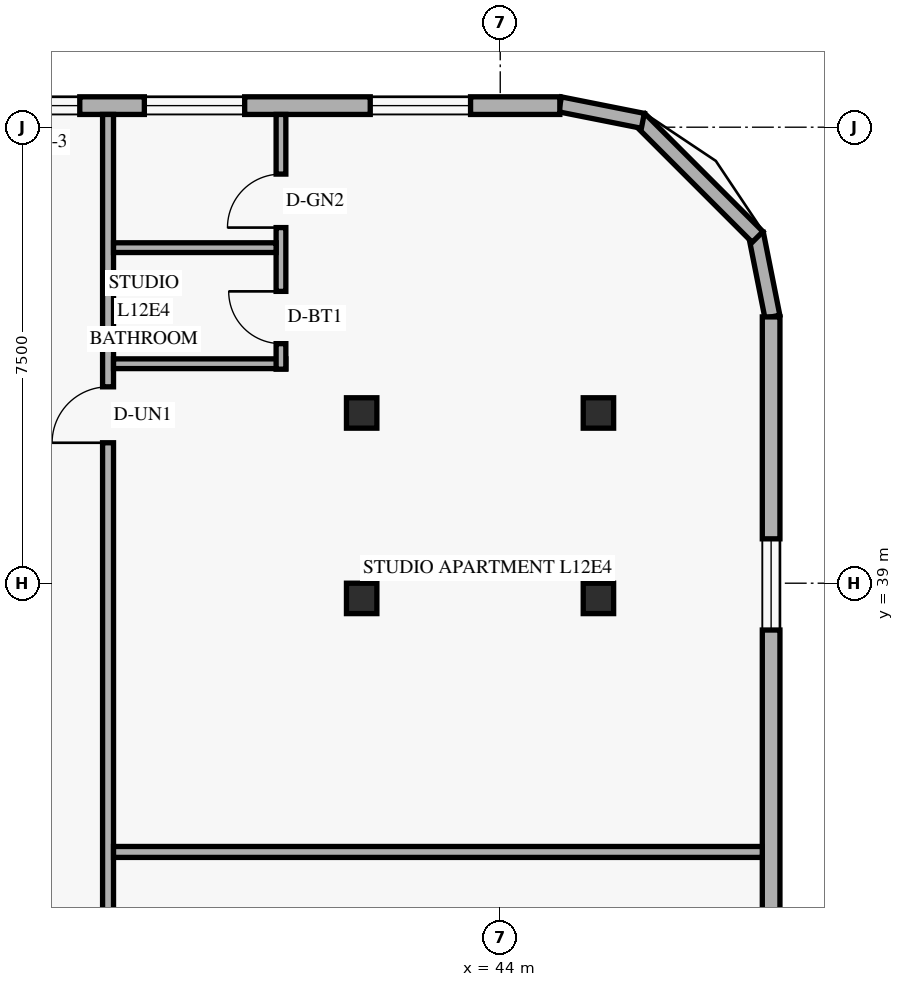
"""IFC4 building model, lengths in metres.
Left out: names, types, materials, properties, quantities, classifications, styles, units other than length and angle.
Written with IfcOpenShell. Run it as: python <this file> out.ifc"""

import sys

from ifc_helpers import new_model, si_unit, direction, frame, frame_2d, origin, origin_2d, place, context, subcontext, project, spatial, rectangle, hollow_rectangle, extrude, element, fill, save


model = new_model("IFC4")
c1 = context("Model", 3, precision=1e-05, world=origin(), true_north=direction((0.0, 1.0)))
c2 = subcontext(c1, "Body", "Model", "MODEL_VIEW")
j1 = project(units=[si_unit("LENGTHUNIT", "METRE"), si_unit("PLANEANGLEUNIT", "RADIAN")], contexts=[c1])
p1 = place(None, origin())
s1 = spatial("IfcSite", under=j1, at=p1, CompositionType="ELEMENT")
p2 = place(p1, origin())
s2 = spatial("IfcBuilding", under=s1, at=p2, CompositionType="ELEMENT")
p3 = place(p2, frame((0.0, 0.0, 49.2)))
s3 = spatial("IfcBuildingStorey", under=s2, at=p3, CompositionType="ELEMENT", Elevation=49.2)
for number, where, z_axis, x_axis in (
    (1, (41.658, 38.75, 0.0), (0.035, 0.0, 0.999), (0.0, 1.0, 0.0)),
    (2, (41.658, 41.8, 0.0), (0.035, 0.0, 0.999), (0.0, 1.0, 0.0)),
):
    element("IfcColumn", number, at=place(p3, frame(where, z_axis=z_axis, x_axis=x_axis)), inside=s3, PredefinedType="COLUMN", context=c2, shape_type="SweptSolid", body=[
        extrude(hollow_rectangle(XDim=0.5, YDim=0.5, WallThickness=0.022, at=origin_2d()), origin(), (0.0, 0.0, 1.0), 3.602),
    ])
for number, where, z_axis, x_axis in (
    (3, (45.51, 38.75, 0.0), (0.058, 0.0, 0.998), (0.0, 1.0, 0.0)),
    (4, (45.51, 41.8, 0.0), (0.058, 0.0, 0.998), (0.0, 1.0, 0.0)),
):
    element("IfcColumn", number, at=place(p3, frame(where, z_axis=z_axis, x_axis=x_axis)), inside=s3, PredefinedType="COLUMN", context=c2, shape_type="SweptSolid", body=[
        extrude(hollow_rectangle(XDim=0.5, YDim=0.5, WallThickness=0.022, at=origin_2d()), origin(), (0.0, 0.0, 1.0), 3.606),
    ])
p4 = place(p3, frame((48.476, 43.384, 0.0), z_axis=(0.0, 0.0, 1.0), x_axis=(-0.19496651342, 0.980809899341, 0.0)))
e5 = element("IfcWall", 5, at=p4, inside=s3, PredefinedType="SOLIDWALL", context=c2, shape_type="SweptSolid", body=[
    extrude(rectangle(XDim=1.389, YDim=0.25, at=frame_2d((0.694, 0.0))), origin(), (0.0, 0.0, 1.0), 3.36),
])
p5 = place(p3, frame((48.232, 44.695, 0.0), z_axis=(0.0, 0.0, 1.0), x_axis=(-0.707106781187, 0.707106781187, 0.0)))
e6 = element("IfcWall", 6, at=p5, inside=s3, PredefinedType="SOLIDWALL", context=c2, shape_type="SweptSolid", body=[
    extrude(rectangle(XDim=2.739, YDim=0.25, at=frame_2d((1.37, 0.0))), origin(), (0.0, 0.0, 1.0), 3.36),
])
p6 = place(p3, frame((46.345, 46.605, 0.0), z_axis=(0.0, 0.0, 1.0), x_axis=(-0.980809899341, 0.19496651342, 0.0)))
e7 = element("IfcWall", 7, at=p6, inside=s3, PredefinedType="SOLIDWALL", context=c2, shape_type="SweptSolid", body=[
    extrude(rectangle(XDim=1.389, YDim=0.25, at=frame_2d((0.694, 0.0))), origin(), (0.0, 0.0, 1.0), 3.36),
])
p7 = place(p3, frame((48.455, 27.8, 0.0), z_axis=(0.0, 0.0, 1.0), x_axis=(0.0, 1.0, 0.0)))
e8 = element("IfcWall", 8, at=p7, inside=s3, PredefinedType="SOLIDWALL", context=c2, shape_type="SweptSolid", body=[
    extrude(rectangle(XDim=15.58, YDim=0.29, at=frame_2d((7.79, 0.0))), origin(), (0.0, 0.0, 1.0), 3.36),
])
p8 = place(p7, frame((2.64, 0.0, 0.85)))
e9 = element("IfcOpeningElement", 9, at=p8, cuts=e8, PredefinedType="OPENING", context=c2, shape_type="SweptSolid", body=[
    extrude(rectangle(XDim=1.5, YDim=1.55, at=frame_2d((0.75, 0.775))), frame((0.0, 0.155, 0.0), z_axis=(0.0, -1.0, 0.0), x_axis=(1.0, 0.0, 0.0)), (0.0, 0.0, 1.0), 0.31),
])
p9 = place(p7, frame((10.43, 0.0, 0.85)))
e10 = element("IfcOpeningElement", 10, at=p9, cuts=e8, PredefinedType="OPENING", context=c2, shape_type="SweptSolid", body=[
    extrude(rectangle(XDim=1.5, YDim=1.55, at=frame_2d((0.75, 0.775))), frame((0.0, 0.155, 0.0), z_axis=(0.0, -1.0, 0.0), x_axis=(1.0, 0.0, 0.0)), (0.0, 0.0, 1.0), 0.31),
])
p10 = place(p3, frame((44.98, 46.855, 0.0), z_axis=(0.0, 0.0, 1.0), x_axis=(-1.0, 0.0, 0.0)))
e11 = element("IfcWall", 11, at=p10, inside=s3, PredefinedType="SOLIDWALL", context=c2, shape_type="SweptSolid", body=[
    extrude(rectangle(XDim=39.56, YDim=0.29, at=frame_2d((19.78, 0.0))), origin(), (0.0, 0.0, 1.0), 3.36),
])
p11 = place(p10, frame((35.295, 0.0, 0.85)))
e12 = element("IfcOpeningElement", 12, at=p11, cuts=e11, PredefinedType="OPENING", context=c2, shape_type="SweptSolid", body=[
    extrude(rectangle(XDim=1.65, YDim=1.6, at=frame_2d((0.825, 0.8))), frame((0.0, 0.155, 0.0), z_axis=(0.0, -1.0, 0.0), x_axis=(1.0, 0.0, 0.0)), (0.0, 0.0, 1.0), 0.31),
])
p12 = place(p10, frame((31.18, 0.0, 0.85)))
e13 = element("IfcOpeningElement", 13, at=p12, cuts=e11, PredefinedType="OPENING", context=c2, shape_type="SweptSolid", body=[
    extrude(rectangle(XDim=1.2, YDim=1.5, at=frame_2d((0.6, 0.75))), frame((0.0, 0.155, 0.0), z_axis=(0.0, -1.0, 0.0), x_axis=(1.0, 0.0, 0.0)), (0.0, 0.0, 1.0), 0.31),
])
p13 = place(p10, frame((25.684, 0.0, 0.85)))
e14 = element("IfcOpeningElement", 14, at=p13, cuts=e11, PredefinedType="OPENING", context=c2, shape_type="SweptSolid", body=[
    extrude(rectangle(XDim=1.65, YDim=1.6, at=frame_2d((0.825, 0.8))), frame((0.0, 0.155, 0.0), z_axis=(0.0, -1.0, 0.0), x_axis=(1.0, 0.0, 0.0)), (0.0, 0.0, 1.0), 0.31),
])
p14 = place(p10, frame((18.649, 0.0, 0.85)))
e15 = element("IfcOpeningElement", 15, at=p14, cuts=e11, PredefinedType="OPENING", context=c2, shape_type="SweptSolid", body=[
    extrude(rectangle(XDim=1.65, YDim=1.6, at=frame_2d((0.825, 0.8))), frame((0.0, 0.155, 0.0), z_axis=(0.0, -1.0, 0.0), x_axis=(1.0, 0.0, 0.0)), (0.0, 0.0, 1.0), 0.31),
])
p15 = place(p10, frame((12.359, 0.0, 0.85)))
e16 = element("IfcOpeningElement", 16, at=p15, cuts=e11, PredefinedType="OPENING", context=c2, shape_type="SweptSolid", body=[
    extrude(rectangle(XDim=1.65, YDim=1.6, at=frame_2d((0.825, 0.8))), frame((0.0, 0.155, 0.0), z_axis=(0.0, -1.0, 0.0), x_axis=(1.0, 0.0, 0.0)), (0.0, 0.0, 1.0), 0.31),
])
p16 = place(p10, frame((7.895, 0.0, 0.85)))
e17 = element("IfcOpeningElement", 17, at=p16, cuts=e11, PredefinedType="OPENING", context=c2, shape_type="SweptSolid", body=[
    extrude(rectangle(XDim=1.2, YDim=1.5, at=frame_2d((0.6, 0.75))), frame((0.0, 0.155, 0.0), z_axis=(0.0, -1.0, 0.0), x_axis=(1.0, 0.0, 0.0)), (0.0, 0.0, 1.0), 0.31),
])
p17 = place(p10, frame((5.183, 0.0, 0.85)))
e18 = element("IfcOpeningElement", 18, at=p17, cuts=e11, PredefinedType="OPENING", context=c2, shape_type="SweptSolid", body=[
    extrude(rectangle(XDim=1.65, YDim=1.6, at=frame_2d((0.825, 0.8))), frame((0.0, 0.155, 0.0), z_axis=(0.0, -1.0, 0.0), x_axis=(1.0, 0.0, 0.0)), (0.0, 0.0, 1.0), 0.31),
])
p18 = place(p10, frame((1.468, 0.0, 0.85)))
e19 = element("IfcOpeningElement", 19, at=p18, cuts=e11, PredefinedType="OPENING", context=c2, shape_type="SweptSolid", body=[
    extrude(rectangle(XDim=1.65, YDim=1.6, at=frame_2d((0.825, 0.8))), frame((0.0, 0.155, 0.0), z_axis=(0.0, -1.0, 0.0), x_axis=(1.0, 0.0, 0.0)), (0.0, 0.0, 1.0), 0.31),
])
p19 = place(p3, frame((37.55, 1.29, 0.0), z_axis=(0.0, 0.0, 1.0), x_axis=(0.0, 1.0, 0.0)))
e20 = element("IfcWall", 20, at=p19, inside=s3, PredefinedType="STANDARD", context=c2, shape_type="SweptSolid", body=[
    extrude(rectangle(XDim=45.42, YDim=0.18, at=frame_2d((22.71, 0.0))), origin(), (0.0, 0.0, 1.0), 2.649),
])
p20 = place(p19, frame((4.46, 0.0, 0.0)))
e21 = element("IfcOpeningElement", 21, at=p20, cuts=e20, PredefinedType="OPENING", context=c2, shape_type="SweptSolid", body=[
    extrude(rectangle(XDim=0.92, YDim=2.15, at=frame_2d((0.46, 1.075))), frame((0.0, 0.1, 0.0), z_axis=(0.0, -1.0, 0.0), x_axis=(1.0, 0.0, 0.0)), (0.0, 0.0, 1.0), 0.2),
])
p21 = place(p19, frame((14.37, 0.0, 0.0)))
e22 = element("IfcOpeningElement", 22, at=p21, cuts=e20, PredefinedType="OPENING", context=c2, shape_type="SweptSolid", body=[
    extrude(rectangle(XDim=0.92, YDim=2.15, at=frame_2d((0.46, 1.075))), frame((0.0, 0.1, 0.0), z_axis=(0.0, -1.0, 0.0), x_axis=(1.0, 0.0, 0.0)), (0.0, 0.0, 1.0), 0.2),
])
p22 = place(p19, frame((25.87, 0.0, 0.0)))
e23 = element("IfcOpeningElement", 23, at=p22, cuts=e20, PredefinedType="OPENING", context=c2, shape_type="SweptSolid", body=[
    extrude(rectangle(XDim=0.92, YDim=2.15, at=frame_2d((0.46, 1.075))), frame((0.0, 0.1, 0.0), z_axis=(0.0, -1.0, 0.0), x_axis=(1.0, 0.0, 0.0)), (0.0, 0.0, 1.0), 0.2),
])
p23 = place(p19, frame((40.02, 0.0, 0.0)))
e24 = element("IfcOpeningElement", 24, at=p23, cuts=e20, PredefinedType="OPENING", context=c2, shape_type="SweptSolid", body=[
    extrude(rectangle(XDim=0.92, YDim=2.15, at=frame_2d((0.46, 1.075))), frame((0.0, 0.1, 0.0), z_axis=(0.0, -1.0, 0.0), x_axis=(1.0, 0.0, 0.0)), (0.0, 0.0, 1.0), 0.2),
])
p24 = place(p3, frame((37.64, 34.58, 0.0), z_axis=(0.0, 0.0, 1.0), x_axis=(1.0, 0.0, 0.0)))
e25 = element("IfcWall", 25, at=p24, inside=s3, PredefinedType="PARTITIONING", context=c2, shape_type="SweptSolid", body=[
    extrude(rectangle(XDim=10.67, YDim=0.18, at=frame_2d((5.335, 0.0))), origin(), (0.0, 0.0, 1.0), 2.649),
])
p25 = place(p3, frame((37.64, 42.61, 0.0), z_axis=(0.0, 0.0, 1.0), x_axis=(1.0, 0.0, 0.0)))
e26 = element("IfcWall", 26, at=p25, inside=s3, PredefinedType="PLUMBINGWALL", context=c2, shape_type="SweptSolid", body=[
    extrude(rectangle(XDim=2.834, YDim=0.16, at=frame_2d((1.417, 0.0))), origin(), (0.0, 0.0, 1.0), 3.36),
])
p26 = place(p3, frame((40.394, 42.52, 0.0), z_axis=(0.0, 0.0, 1.0), x_axis=(0.0, 1.0, 0.0)))
e27 = element("IfcWall", 27, at=p26, inside=s3, PredefinedType="PLUMBINGWALL", context=c2, shape_type="SweptSolid", body=[
    extrude(rectangle(XDim=4.19, YDim=0.16, at=frame_2d((2.095, 0.0))), origin(), (0.0, 0.0, 1.0), 3.36),
])
p27 = place(p26, frame((0.42, 0.0, 0.0)))
e28 = element("IfcOpeningElement", 28, at=p27, cuts=e27, PredefinedType="OPENING", context=c2, shape_type="SweptSolid", body=[
    extrude(rectangle(XDim=0.86, YDim=2.12, at=frame_2d((0.43, 1.06))), frame((0.0, 0.09, 0.0), z_axis=(0.0, -1.0, 0.0), x_axis=(1.0, 0.0, 0.0)), (0.0, 0.0, 1.0), 0.18),
])
p28 = place(p26, frame((2.329, 0.0, 0.0)))
e29 = element("IfcOpeningElement", 29, at=p28, cuts=e27, PredefinedType="OPENING", context=c2, shape_type="SweptSolid", body=[
    extrude(rectangle(XDim=0.88, YDim=2.12, at=frame_2d((0.44, 1.06))), frame((0.0, 0.09, 0.0), z_axis=(0.0, -1.0, 0.0), x_axis=(1.0, 0.0, 0.0)), (0.0, 0.0, 1.0), 0.18),
])
p29 = place(p3, frame((37.64, 44.519, 0.0), z_axis=(0.0, 0.0, 1.0), x_axis=(1.0, 0.0, 0.0)))
e30 = element("IfcWall", 30, at=p29, inside=s3, PredefinedType="PLUMBINGWALL", context=c2, shape_type="SweptSolid", body=[
    extrude(rectangle(XDim=2.674, YDim=0.16, at=frame_2d((1.337, 0.0))), origin(), (0.0, 0.0, 1.0), 3.36),
])
p30 = place(p9, origin())
e31 = element("IfcWindow", 31, at=p30, inside=s3, PartitioningType="SINGLE_PANEL", PredefinedType="WINDOW", context=c2, shape_type="SweptSolid", body=[
    extrude(rectangle(XDim=1.5, YDim=1.55, at=frame_2d((0.75, 0.775))), frame((0.0, 0.03, 0.0), z_axis=(0.0, -1.0, 0.0), x_axis=(1.0, 0.0, 0.0)), (0.0, 0.0, 1.0), 0.06),
])
fill(e10, e31)
p31 = place(p16, origin())
e32 = element("IfcWindow", 32, at=p31, inside=s3, PartitioningType="SINGLE_PANEL", PredefinedType="WINDOW", context=c2, shape_type="SweptSolid", body=[
    extrude(rectangle(XDim=1.2, YDim=1.5, at=frame_2d((0.6, 0.75))), frame((0.0, 0.03, 0.0), z_axis=(0.0, -1.0, 0.0), x_axis=(1.0, 0.0, 0.0)), (0.0, 0.0, 1.0), 0.06),
])
fill(e17, e32)
p32 = place(p17, origin())
e33 = element("IfcWindow", 33, at=p32, inside=s3, PartitioningType="SINGLE_PANEL", PredefinedType="WINDOW", context=c2, shape_type="SweptSolid", body=[
    extrude(rectangle(XDim=1.65, YDim=1.6, at=frame_2d((0.825, 0.8))), frame((0.0, 0.03, 0.0), z_axis=(0.0, -1.0, 0.0), x_axis=(1.0, 0.0, 0.0)), (0.0, 0.0, 1.0), 0.06),
])
fill(e18, e33)
p33 = place(p18, origin())
e34 = element("IfcWindow", 34, at=p33, inside=s3, PartitioningType="SINGLE_PANEL", PredefinedType="WINDOW", context=c2, shape_type="SweptSolid", body=[
    extrude(rectangle(XDim=1.65, YDim=1.6, at=frame_2d((0.825, 0.8))), frame((0.0, 0.03, 0.0), z_axis=(0.0, -1.0, 0.0), x_axis=(1.0, 0.0, 0.0)), (0.0, 0.0, 1.0), 0.06),
])
fill(e19, e34)
p34 = place(p23, origin())
e35 = element("IfcDoor", 35, at=p34, inside=s3, OperationType="SINGLE_SWING_LEFT", PredefinedType="DOOR", context=c2, shape_type="SweptSolid", body=[
    extrude(rectangle(XDim=0.92, YDim=2.15, at=frame_2d((0.46, 1.075))), frame((0.0, 0.025, 0.0), z_axis=(0.0, -1.0, 0.0), x_axis=(1.0, 0.0, 0.0)), (0.0, 0.0, 1.0), 0.05),
])
fill(e24, e35)
p35 = place(p27, origin())
e36 = element("IfcDoor", 36, at=p35, inside=s3, OperationType="SINGLE_SWING_RIGHT", PredefinedType="DOOR", context=c2, shape_type="SweptSolid", body=[
    extrude(rectangle(XDim=0.86, YDim=2.12, at=frame_2d((0.43, 1.06))), frame((0.0, 0.025, 0.0), z_axis=(0.0, -1.0, 0.0), x_axis=(1.0, 0.0, 0.0)), (0.0, 0.0, 1.0), 0.05),
])
fill(e28, e36)
p36 = place(p28, origin())
e37 = element("IfcDoor", 37, at=p36, inside=s3, OperationType="SINGLE_SWING_LEFT", PredefinedType="DOOR", context=c2, shape_type="SweptSolid", body=[
    extrude(rectangle(XDim=0.88, YDim=2.12, at=frame_2d((0.44, 1.06))), frame((0.0, 0.025, 0.0), z_axis=(0.0, -1.0, 0.0), x_axis=(1.0, 0.0, 0.0)), (0.0, 0.0, 1.0), 0.05),
])
fill(e29, e37)
save(model, sys.argv[1])
